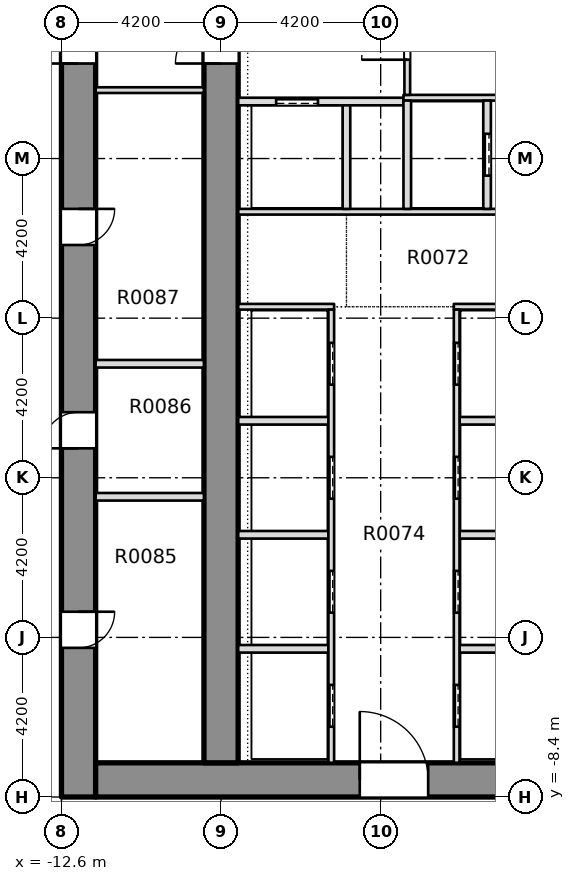
"""IFC4 building model, lengths in metres.
Left out: names, types, materials, properties, quantities, classifications, styles, units other than length and angle.
Written with IfcOpenShell. Run it as: python <this file> out.ifc"""

import sys

from ifc_helpers import new_model, si_unit, direction, frame, frame_2d, origin, place, context, subcontext, project, spatial, rectangle, extrude, element, fill, save


model = new_model("IFC4")
c1 = context("Model", 3, precision=1e-05, world=origin(), true_north=direction((0.0, 1.0)))
c2 = subcontext(c1, "Body", "Model", "MODEL_VIEW")
j1 = project(units=[si_unit("LENGTHUNIT", "METRE"), si_unit("PLANEANGLEUNIT", "RADIAN")], contexts=[c1])
p1 = place(None, origin())
s1 = spatial("IfcSite", under=j1, at=p1, CompositionType="ELEMENT")
p2 = place(p1, origin())
s2 = spatial("IfcBuilding", under=s1, at=p2, CompositionType="ELEMENT")
p3 = place(p2, origin())
s3 = spatial("IfcBuildingStorey", under=s2, at=p3, CompositionType="ELEMENT", Elevation=0.0)
p4 = place(p3, frame((-12.15, -8.4, -0.45), z_axis=(0.0, 0.0, 1.0), x_axis=(0.0, 1.0, 0.0)))
e1 = element("IfcWall", 1, at=p4, inside=s3, PredefinedType="SHEAR", context=c2, shape_type="SweptSolid", body=[
    extrude(rectangle(XDim=30.15, YDim=0.9, at=frame_2d((15.075, 0.0))), origin(), (0.0, 0.0, 1.0), 7.55),
])
p5 = place(p4, frame((3.925, 0.0, 0.45)))
e2 = element("IfcOpeningElement", 2, at=p5, cuts=e1, PredefinedType="OPENING", context=c2, shape_type="SweptSolid", body=[
    extrude(rectangle(XDim=0.95, YDim=2.1, at=frame_2d((0.475, 1.05))), frame((0.0, 0.46, 0.0), z_axis=(0.0, -1.0, 0.0), x_axis=(1.0, 0.0, 0.0)), (0.0, 0.0, 1.0), 0.92),
])
p6 = place(p4, frame((9.175, 0.0, 0.45)))
e3 = element("IfcOpeningElement", 3, at=p6, cuts=e1, PredefinedType="OPENING", context=c2, shape_type="SweptSolid", body=[
    extrude(rectangle(XDim=0.95, YDim=2.1, at=frame_2d((0.475, 1.05))), frame((0.0, 0.46, 0.0), z_axis=(0.0, -1.0, 0.0), x_axis=(1.0, 0.0, 0.0)), (0.0, 0.0, 1.0), 0.92),
])
p7 = place(p4, frame((14.525, 0.0, 0.45)))
e4 = element("IfcOpeningElement", 4, at=p7, cuts=e1, PredefinedType="OPENING", context=c2, shape_type="SweptSolid", body=[
    extrude(rectangle(XDim=0.95, YDim=2.1, at=frame_2d((0.475, 1.05))), frame((0.0, 0.46, 0.0), z_axis=(0.0, -1.0, 0.0), x_axis=(1.0, 0.0, 0.0)), (0.0, 0.0, 1.0), 0.92),
])
p8 = place(p4, frame((22.225, 0.0, 0.45)))
e5 = element("IfcOpeningElement", 5, at=p8, cuts=e1, PredefinedType="OPENING", context=c2, shape_type="SweptSolid", body=[
    extrude(rectangle(XDim=0.95, YDim=2.1, at=frame_2d((0.475, 1.05))), frame((0.0, 0.46, 0.0), z_axis=(0.0, -1.0, 0.0), x_axis=(1.0, 0.0, 0.0)), (0.0, 0.0, 1.0), 0.92),
])
p9 = place(p4, frame((26.25, 0.0, 0.45)))
e6 = element("IfcOpeningElement", 6, at=p9, cuts=e1, PredefinedType="OPENING", context=c2, shape_type="SweptSolid", body=[
    extrude(rectangle(XDim=0.95, YDim=2.1, at=frame_2d((0.475, 1.05))), frame((0.0, 0.46, 0.0), z_axis=(0.0, -1.0, 0.0), x_axis=(1.0, 0.0, 0.0)), (0.0, 0.0, 1.0), 0.92),
])
p10 = place(p4, frame((19.3, 0.0, 0.45)))
e7 = element("IfcOpeningElement", 7, at=p10, cuts=e1, PredefinedType="OPENING", context=c2, shape_type="SweptSolid", body=[
    extrude(rectangle(XDim=1.2, YDim=2.1, at=frame_2d((0.6, 1.05))), frame((0.0, 0.46, 0.0), z_axis=(0.0, -1.0, 0.0), x_axis=(1.0, 0.0, 0.0)), (0.0, 0.0, 1.0), 0.92),
])
p11 = place(p3, frame((-11.7, -7.95, -0.45), z_axis=(0.0, 0.0, 1.0), x_axis=(1.0, 0.0, 0.0)))
e8 = element("IfcWall", 8, at=p11, inside=s3, PredefinedType="SHEAR", context=c2, shape_type="SweptSolid", body=[
    extrude(rectangle(XDim=23.4, YDim=0.9, at=frame_2d((11.7, 0.0))), origin(), (0.0, 0.0, 1.0), 7.55),
])
p12 = place(p11, frame((6.95, 0.0, 0.45)))
e9 = element("IfcOpeningElement", 9, at=p12, cuts=e8, PredefinedType="OPENING", context=c2, shape_type="SweptSolid", body=[
    extrude(rectangle(XDim=1.8, YDim=2.1, at=frame_2d((0.9, 1.05))), frame((0.0, 0.46, 0.0), z_axis=(0.0, -1.0, 0.0), x_axis=(1.0, 0.0, 0.0)), (0.0, 0.0, 1.0), 0.92),
])
p13 = place(p11, frame((14.65, 0.0, 0.45)))
e10 = element("IfcOpeningElement", 10, at=p13, cuts=e8, PredefinedType="OPENING", context=c2, shape_type="SweptSolid", body=[
    extrude(rectangle(XDim=1.8, YDim=2.1, at=frame_2d((0.9, 1.05))), frame((0.0, 0.46, 0.0), z_axis=(0.0, -1.0, 0.0), x_axis=(1.0, 0.0, 0.0)), (0.0, 0.0, 1.0), 0.92),
])
p14 = place(p3, frame((-8.4, -7.5, -0.45), z_axis=(0.0, 0.0, 1.0), x_axis=(0.0, 1.0, 0.0)))
e11 = element("IfcWall", 11, at=p14, inside=s3, PredefinedType="SHEAR", context=c2, shape_type="SweptSolid", body=[
    extrude(rectangle(XDim=28.35, YDim=0.9, at=frame_2d((14.175, 0.0))), origin(), (0.0, 0.0, 1.0), 7.55),
])
p15 = place(p14, frame((18.4, 0.0, 0.45)))
e12 = element("IfcOpeningElement", 12, at=p15, cuts=e11, PredefinedType="OPENING", context=c2, shape_type="SweptSolid", body=[
    extrude(rectangle(XDim=1.2, YDim=2.1, at=frame_2d((0.6, 1.05))), frame((0.0, 0.46, 0.0), z_axis=(0.0, -1.0, 0.0), x_axis=(1.0, 0.0, 0.0)), (0.0, 0.0, 1.0), 0.92),
])
p16 = place(p3, frame((-7.949, -4.5, 0.0), z_axis=(0.0, 0.0, 1.0), x_axis=(1.0, 0.0, 0.0)))
e13 = element("IfcWall", 13, at=p16, inside=s3, PredefinedType="PARTITIONING", context=c2, shape_type="SweptSolid", body=[
    extrude(rectangle(XDim=2.374, YDim=0.2, at=frame_2d((1.187, 0.0))), origin(), (0.0, 0.0, 1.0), 7.1),
])
p17 = place(p3, frame((-2.125, -4.5, 0.0), z_axis=(0.0, 0.0, 1.0), x_axis=(1.0, 0.0, 0.0)))
e14 = element("IfcWall", 14, at=p17, inside=s3, PredefinedType="PARTITIONING", context=c2, shape_type="SweptSolid", body=[
    extrude(rectangle(XDim=4.25, YDim=0.2, at=frame_2d((2.125, 0.0))), origin(), (0.0, 0.0, 1.0), 7.1),
])
p18 = place(p3, frame((-7.949, -1.5, 0.0), z_axis=(0.0, 0.0, 1.0), x_axis=(1.0, 0.0, 0.0)))
e15 = element("IfcWall", 15, at=p18, inside=s3, PredefinedType="PARTITIONING", context=c2, shape_type="SweptSolid", body=[
    extrude(rectangle(XDim=2.374, YDim=0.2, at=frame_2d((1.187, 0.0))), origin(), (0.0, 0.0, 1.0), 7.1),
])
p19 = place(p3, frame((-2.125, -1.5, 0.0), z_axis=(0.0, 0.0, 1.0), x_axis=(1.0, 0.0, 0.0)))
e16 = element("IfcWall", 16, at=p19, inside=s3, PredefinedType="PARTITIONING", context=c2, shape_type="SweptSolid", body=[
    extrude(rectangle(XDim=4.25, YDim=0.2, at=frame_2d((2.125, 0.0))), origin(), (0.0, 0.0, 1.0), 7.1),
])
p20 = place(p3, frame((-7.949, 1.5, 0.0), z_axis=(0.0, 0.0, 1.0), x_axis=(1.0, 0.0, 0.0)))
e17 = element("IfcWall", 17, at=p20, inside=s3, PredefinedType="PARTITIONING", context=c2, shape_type="SweptSolid", body=[
    extrude(rectangle(XDim=2.374, YDim=0.2, at=frame_2d((1.187, 0.0))), origin(), (0.0, 0.0, 1.0), 7.1),
])
p21 = place(p3, frame((-2.125, 1.5, 0.0), z_axis=(0.0, 0.0, 1.0), x_axis=(1.0, 0.0, 0.0)))
e18 = element("IfcWall", 18, at=p21, inside=s3, PredefinedType="PARTITIONING", context=c2, shape_type="SweptSolid", body=[
    extrude(rectangle(XDim=4.25, YDim=0.2, at=frame_2d((2.125, 0.0))), origin(), (0.0, 0.0, 1.0), 7.1),
])
p22 = place(p3, frame((-7.949, 4.5, 0.0), z_axis=(0.0, 0.0, 1.0), x_axis=(1.0, 0.0, 0.0)))
e19 = element("IfcWall", 19, at=p22, inside=s3, PredefinedType="PARTITIONING", context=c2, shape_type="SweptSolid", body=[
    extrude(rectangle(XDim=2.524, YDim=0.15, at=frame_2d((1.262, 0.0))), origin(), (0.0, 0.0, 1.0), 7.1),
])
p23 = place(p3, frame((-2.275, 4.5, 0.0), z_axis=(0.0, 0.0, 1.0), x_axis=(1.0, 0.0, 0.0)))
e20 = element("IfcWall", 20, at=p23, inside=s3, PredefinedType="PARTITIONING", context=c2, shape_type="SweptSolid", body=[
    extrude(rectangle(XDim=4.55, YDim=0.15, at=frame_2d((2.275, 0.0))), origin(), (0.0, 0.0, 1.0), 7.1),
])
p24 = place(p3, frame((-7.949, 7.0, 0.0), z_axis=(0.0, 0.0, 1.0), x_axis=(1.0, 0.0, 0.0)))
e21 = element("IfcWall", 21, at=p24, inside=s3, PredefinedType="PARTITIONING", context=c2, shape_type="SweptSolid", body=[
    extrude(rectangle(XDim=15.898, YDim=0.15, at=frame_2d((7.949, 0.0))), origin(), (0.0, 0.0, 1.0), 7.1),
])
p25 = place(p24, frame((7.249, 0.0, 0.0)))
e22 = element("IfcOpeningElement", 22, at=p25, cuts=e21, PredefinedType="OPENING", context=c2, shape_type="SweptSolid", body=[
    extrude(rectangle(XDim=1.4, YDim=2.1, at=frame_2d((0.7, 1.05))), frame((0.0, 0.085, 0.0), z_axis=(0.0, -1.0, 0.0), x_axis=(1.0, 0.0, 0.0)), (0.0, 0.0, 1.0), 0.17),
])
p26 = place(p3, frame((-7.949, 9.9, 0.0), z_axis=(0.0, 0.0, 1.0), x_axis=(1.0, 0.0, 0.0)))
e23 = element("IfcWall", 23, at=p26, inside=s3, PredefinedType="PARTITIONING", context=c2, shape_type="SweptSolid", body=[
    extrude(rectangle(XDim=4.349, YDim=0.2, at=frame_2d((2.174, 0.0))), origin(), (0.0, 0.0, 1.0), 7.1),
])
p27 = place(p26, frame((0.999, 0.0, 0.0)))
e24 = element("IfcOpeningElement", 24, at=p27, cuts=e23, PredefinedType="OPENING", context=c2, shape_type="SweptSolid", body=[
    extrude(rectangle(XDim=1.1, YDim=2.1, at=frame_2d((0.55, 1.05))), frame((0.0, 0.11, 0.0), z_axis=(0.0, -1.0, 0.0), x_axis=(1.0, 0.0, 0.0)), (0.0, 0.0, 1.0), 0.22),
])
p28 = place(p3, frame((-3.6, 10.0, 0.0), z_axis=(0.0, 0.0, 1.0), x_axis=(1.0, 0.0, 0.0)))
e25 = element("IfcWall", 25, at=p28, inside=s3, PredefinedType="PARTITIONING", context=c2, shape_type="SweptSolid", body=[
    extrude(rectangle(XDim=7.2, YDim=0.15, at=frame_2d((3.6, 0.0))), origin(), (0.0, 0.0, 1.0), 7.1),
])
p29 = place(p28, frame((2.9, 0.0, 0.0)))
e26 = element("IfcOpeningElement", 26, at=p29, cuts=e25, PredefinedType="OPENING", context=c2, shape_type="SweptSolid", body=[
    extrude(rectangle(XDim=1.4, YDim=2.1, at=frame_2d((0.7, 1.05))), frame((0.0, 0.085, 0.0), z_axis=(0.0, -1.0, 0.0), x_axis=(1.0, 0.0, 0.0)), (0.0, 0.0, 1.0), 0.17),
])
p30 = place(p3, frame((-5.5, -7.499, 0.0), z_axis=(0.0, 0.0, 1.0), x_axis=(0.0, 1.0, 0.0)))
e27 = element("IfcWall", 27, at=p30, inside=s3, PredefinedType="PARTITIONING", context=c2, shape_type="SweptSolid", body=[
    extrude(rectangle(XDim=11.924, YDim=0.15, at=frame_2d((5.962, 0.0))), origin(), (0.0, 0.0, 1.0), 7.1),
])
p31 = place(p30, frame((0.949, 0.0, 0.0)))
e28 = element("IfcOpeningElement", 28, at=p31, cuts=e27, PredefinedType="OPENING", context=c2, shape_type="SweptSolid", body=[
    extrude(rectangle(XDim=1.1, YDim=2.1, at=frame_2d((0.55, 1.05))), frame((0.0, 0.085, 0.0), z_axis=(0.0, -1.0, 0.0), x_axis=(1.0, 0.0, 0.0)), (0.0, 0.0, 1.0), 0.17),
])
p32 = place(p30, frame((3.949, 0.0, 0.0)))
e29 = element("IfcOpeningElement", 29, at=p32, cuts=e27, PredefinedType="OPENING", context=c2, shape_type="SweptSolid", body=[
    extrude(rectangle(XDim=1.1, YDim=2.1, at=frame_2d((0.55, 1.05))), frame((0.0, 0.085, 0.0), z_axis=(0.0, -1.0, 0.0), x_axis=(1.0, 0.0, 0.0)), (0.0, 0.0, 1.0), 0.17),
])
p33 = place(p30, frame((6.949, 0.0, 0.0)))
e30 = element("IfcOpeningElement", 30, at=p33, cuts=e27, PredefinedType="OPENING", context=c2, shape_type="SweptSolid", body=[
    extrude(rectangle(XDim=1.1, YDim=2.1, at=frame_2d((0.55, 1.05))), frame((0.0, 0.085, 0.0), z_axis=(0.0, -1.0, 0.0), x_axis=(1.0, 0.0, 0.0)), (0.0, 0.0, 1.0), 0.17),
])
p34 = place(p30, frame((9.949, 0.0, 0.0)))
e31 = element("IfcOpeningElement", 31, at=p34, cuts=e27, PredefinedType="OPENING", context=c2, shape_type="SweptSolid", body=[
    extrude(rectangle(XDim=1.1, YDim=2.1, at=frame_2d((0.55, 1.05))), frame((0.0, 0.085, 0.0), z_axis=(0.0, -1.0, 0.0), x_axis=(1.0, 0.0, 0.0)), (0.0, 0.0, 1.0), 0.17),
])
p35 = place(p3, frame((-5.1, 7.075, 0.0), z_axis=(0.0, 0.0, 1.0), x_axis=(0.0, 1.0, 0.0)))
e32 = element("IfcWall", 32, at=p35, inside=s3, PredefinedType="PARTITIONING", context=c2, shape_type="SweptSolid", body=[
    extrude(rectangle(XDim=2.725, YDim=0.2, at=frame_2d((1.363, 0.0))), origin(), (0.0, 0.0, 1.0), 7.1),
])
p36 = place(p3, frame((-3.5, 7.075, 0.0), z_axis=(0.0, 0.0, 1.0), x_axis=(0.0, 1.0, 0.0)))
e33 = element("IfcWall", 33, at=p36, inside=s3, PredefinedType="PARTITIONING", context=c2, shape_type="SweptSolid", body=[
    extrude(rectangle(XDim=2.85, YDim=0.2, at=frame_2d((1.425, 0.0))), origin(), (0.0, 0.0, 1.0), 7.1),
])
p37 = place(p3, frame((-3.5, 10.075, 0.0), z_axis=(0.0, 0.0, 1.0), x_axis=(0.0, 1.0, 0.0)))
e34 = element("IfcWall", 34, at=p37, inside=s3, PredefinedType="PARTITIONING", context=c2, shape_type="SweptSolid", body=[
    extrude(rectangle(XDim=3.075, YDim=0.15, at=frame_2d((1.538, 0.0))), origin(), (0.0, 0.0, 1.0), 7.1),
])
p38 = place(p37, frame((0.925, 0.0, 0.0)))
e35 = element("IfcOpeningElement", 35, at=p38, cuts=e34, PredefinedType="OPENING", context=c2, shape_type="SweptSolid", body=[
    extrude(rectangle(XDim=1.2, YDim=2.1, at=frame_2d((0.6, 1.05))), frame((0.0, 0.085, 0.0), z_axis=(0.0, -1.0, 0.0), x_axis=(1.0, 0.0, 0.0)), (0.0, 0.0, 1.0), 0.17),
])
p39 = place(p3, frame((-2.2, -7.499, 0.0), z_axis=(0.0, 0.0, 1.0), x_axis=(0.0, 1.0, 0.0)))
e36 = element("IfcWall", 36, at=p39, inside=s3, PredefinedType="PARTITIONING", context=c2, shape_type="SweptSolid", body=[
    extrude(rectangle(XDim=11.924, YDim=0.15, at=frame_2d((5.962, 0.0))), origin(), (0.0, 0.0, 1.0), 7.1),
])
p40 = place(p39, frame((0.949, 0.0, 0.0)))
e37 = element("IfcOpeningElement", 37, at=p40, cuts=e36, PredefinedType="OPENING", context=c2, shape_type="SweptSolid", body=[
    extrude(rectangle(XDim=1.1, YDim=2.1, at=frame_2d((0.55, 1.05))), frame((0.0, 0.085, 0.0), z_axis=(0.0, -1.0, 0.0), x_axis=(1.0, 0.0, 0.0)), (0.0, 0.0, 1.0), 0.17),
])
p41 = place(p39, frame((3.949, 0.0, 0.0)))
e38 = element("IfcOpeningElement", 38, at=p41, cuts=e36, PredefinedType="OPENING", context=c2, shape_type="SweptSolid", body=[
    extrude(rectangle(XDim=1.1, YDim=2.1, at=frame_2d((0.55, 1.05))), frame((0.0, 0.085, 0.0), z_axis=(0.0, -1.0, 0.0), x_axis=(1.0, 0.0, 0.0)), (0.0, 0.0, 1.0), 0.17),
])
p42 = place(p39, frame((6.949, 0.0, 0.0)))
e39 = element("IfcOpeningElement", 39, at=p42, cuts=e36, PredefinedType="OPENING", context=c2, shape_type="SweptSolid", body=[
    extrude(rectangle(XDim=1.1, YDim=2.1, at=frame_2d((0.55, 1.05))), frame((0.0, 0.085, 0.0), z_axis=(0.0, -1.0, 0.0), x_axis=(1.0, 0.0, 0.0)), (0.0, 0.0, 1.0), 0.17),
])
p43 = place(p39, frame((9.949, 0.0, 0.0)))
e40 = element("IfcOpeningElement", 40, at=p43, cuts=e36, PredefinedType="OPENING", context=c2, shape_type="SweptSolid", body=[
    extrude(rectangle(XDim=1.1, YDim=2.1, at=frame_2d((0.55, 1.05))), frame((0.0, 0.085, 0.0), z_axis=(0.0, -1.0, 0.0), x_axis=(1.0, 0.0, 0.0)), (0.0, 0.0, 1.0), 0.17),
])
p44 = place(p3, frame((-1.4, 7.075, 0.0), z_axis=(0.0, 0.0, 1.0), x_axis=(0.0, 1.0, 0.0)))
e41 = element("IfcWall", 41, at=p44, inside=s3, PredefinedType="PARTITIONING", context=c2, shape_type="SweptSolid", body=[
    extrude(rectangle(XDim=2.85, YDim=0.2, at=frame_2d((1.425, 0.0))), origin(), (0.0, 0.0, 1.0), 7.1),
])
p45 = place(p44, frame((0.875, 0.0, 0.0)))
e42 = element("IfcOpeningElement", 42, at=p45, cuts=e41, PredefinedType="OPENING", context=c2, shape_type="SweptSolid", body=[
    extrude(rectangle(XDim=1.1, YDim=2.1, at=frame_2d((0.55, 1.05))), frame((0.0, 0.11, 0.0), z_axis=(0.0, -1.0, 0.0), x_axis=(1.0, 0.0, 0.0)), (0.0, 0.0, 1.0), 0.22),
])
for number, where, z_axis, x_axis in (
    (43, (-11.699, -0.5, 0.0), (0.0, 0.0, 1.0), (1.0, 0.0, 0.0)),
    (44, (-11.699, 3.0, 0.0), (0.0, 0.0, 1.0), (1.0, 0.0, 0.0)),
):
    element("IfcWall", number, at=place(p3, frame(where, z_axis=z_axis, x_axis=x_axis)), inside=s3, PredefinedType="PARTITIONING", context=c2, shape_type="SweptSolid", body=[
        extrude(rectangle(XDim=2.848, YDim=0.2, at=frame_2d((1.424, 0.0))), origin(), (0.0, 0.0, 1.0), 7.1),
    ])
p46 = place(p3, frame((-11.699, 10.2, 0.0), z_axis=(0.0, 0.0, 1.0), x_axis=(1.0, 0.0, 0.0)))
e45 = element("IfcWall", 45, at=p46, inside=s3, PredefinedType="PARTITIONING", context=c2, shape_type="SweptSolid", body=[
    extrude(rectangle(XDim=2.848, YDim=0.15, at=frame_2d((1.424, 0.0))), origin(), (0.0, 0.0, 1.0), 7.1),
])
p47 = place(p31, origin())
e46 = element("IfcDoor", 46, at=p47, inside=s3, OperationType="SLIDING_TO_RIGHT", PredefinedType="DOOR", context=c2, shape_type="SweptSolid", body=[
    extrude(rectangle(XDim=1.1, YDim=2.1, at=frame_2d((0.55, 1.05))), frame((0.0, 0.025, 0.0), z_axis=(0.0, -1.0, 0.0), x_axis=(1.0, 0.0, 0.0)), (0.0, 0.0, 1.0), 0.05),
])
fill(e28, e46)
p48 = place(p32, origin())
e47 = element("IfcDoor", 47, at=p48, inside=s3, OperationType="SLIDING_TO_RIGHT", PredefinedType="DOOR", context=c2, shape_type="SweptSolid", body=[
    extrude(rectangle(XDim=1.1, YDim=2.1, at=frame_2d((0.55, 1.05))), frame((0.0, 0.025, 0.0), z_axis=(0.0, -1.0, 0.0), x_axis=(1.0, 0.0, 0.0)), (0.0, 0.0, 1.0), 0.05),
])
fill(e29, e47)
p49 = place(p33, origin())
e48 = element("IfcDoor", 48, at=p49, inside=s3, OperationType="SLIDING_TO_RIGHT", PredefinedType="DOOR", context=c2, shape_type="SweptSolid", body=[
    extrude(rectangle(XDim=1.1, YDim=2.1, at=frame_2d((0.55, 1.05))), frame((0.0, 0.025, 0.0), z_axis=(0.0, -1.0, 0.0), x_axis=(1.0, 0.0, 0.0)), (0.0, 0.0, 1.0), 0.05),
])
fill(e30, e48)
p50 = place(p34, origin())
e49 = element("IfcDoor", 49, at=p50, inside=s3, OperationType="SLIDING_TO_RIGHT", PredefinedType="DOOR", context=c2, shape_type="SweptSolid", body=[
    extrude(rectangle(XDim=1.1, YDim=2.1, at=frame_2d((0.55, 1.05))), frame((0.0, 0.025, 0.0), z_axis=(0.0, -1.0, 0.0), x_axis=(1.0, 0.0, 0.0)), (0.0, 0.0, 1.0), 0.05),
])
fill(e31, e49)
p51 = place(p40, origin())
e50 = element("IfcDoor", 50, at=p51, inside=s3, OperationType="SLIDING_TO_RIGHT", PredefinedType="DOOR", context=c2, shape_type="SweptSolid", body=[
    extrude(rectangle(XDim=1.1, YDim=2.1, at=frame_2d((0.55, 1.05))), frame((0.0, 0.025, 0.0), z_axis=(0.0, -1.0, 0.0), x_axis=(1.0, 0.0, 0.0)), (0.0, 0.0, 1.0), 0.05),
])
fill(e37, e50)
p52 = place(p41, origin())
e51 = element("IfcDoor", 51, at=p52, inside=s3, OperationType="SLIDING_TO_RIGHT", PredefinedType="DOOR", context=c2, shape_type="SweptSolid", body=[
    extrude(rectangle(XDim=1.1, YDim=2.1, at=frame_2d((0.55, 1.05))), frame((0.0, 0.025, 0.0), z_axis=(0.0, -1.0, 0.0), x_axis=(1.0, 0.0, 0.0)), (0.0, 0.0, 1.0), 0.05),
])
fill(e38, e51)
p53 = place(p42, origin())
e52 = element("IfcDoor", 52, at=p53, inside=s3, OperationType="SLIDING_TO_RIGHT", PredefinedType="DOOR", context=c2, shape_type="SweptSolid", body=[
    extrude(rectangle(XDim=1.1, YDim=2.1, at=frame_2d((0.55, 1.05))), frame((0.0, 0.025, 0.0), z_axis=(0.0, -1.0, 0.0), x_axis=(1.0, 0.0, 0.0)), (0.0, 0.0, 1.0), 0.05),
])
fill(e39, e52)
p54 = place(p43, origin())
e53 = element("IfcDoor", 53, at=p54, inside=s3, OperationType="SLIDING_TO_RIGHT", PredefinedType="DOOR", context=c2, shape_type="SweptSolid", body=[
    extrude(rectangle(XDim=1.1, YDim=2.1, at=frame_2d((0.55, 1.05))), frame((0.0, 0.025, 0.0), z_axis=(0.0, -1.0, 0.0), x_axis=(1.0, 0.0, 0.0)), (0.0, 0.0, 1.0), 0.05),
])
fill(e40, e53)
p55 = place(p27, origin())
e54 = element("IfcDoor", 54, at=p55, inside=s3, OperationType="SLIDING_TO_RIGHT", PredefinedType="DOOR", context=c2, shape_type="SweptSolid", body=[
    extrude(rectangle(XDim=1.1, YDim=2.1, at=frame_2d((0.55, 1.05))), frame((0.0, 0.025, 0.0), z_axis=(0.0, -1.0, 0.0), x_axis=(1.0, 0.0, 0.0)), (0.0, 0.0, 1.0), 0.05),
])
fill(e24, e54)
p56 = place(p45, origin())
e55 = element("IfcDoor", 55, at=p56, inside=s3, OperationType="SLIDING_TO_RIGHT", PredefinedType="DOOR", context=c2, shape_type="SweptSolid", body=[
    extrude(rectangle(XDim=1.1, YDim=2.1, at=frame_2d((0.55, 1.05))), frame((0.0, 0.025, 0.0), z_axis=(0.0, -1.0, 0.0), x_axis=(1.0, 0.0, 0.0)), (0.0, 0.0, 1.0), 0.05),
])
fill(e42, e55)
p57 = place(p38, origin())
e56 = element("IfcDoor", 56, at=p57, inside=s3, OperationType="SINGLE_SWING_RIGHT", PredefinedType="DOOR", context=c2, shape_type="SweptSolid", body=[
    extrude(rectangle(XDim=1.2, YDim=2.1, at=frame_2d((0.6, 1.05))), frame((0.0, 0.025, 0.0), z_axis=(0.0, -1.0, 0.0), x_axis=(1.0, 0.0, 0.0)), (0.0, 0.0, 1.0), 0.05),
])
fill(e35, e56)
p58 = place(p12, origin())
e57 = element("IfcDoor", 57, at=p58, inside=s3, OperationType="SINGLE_SWING_LEFT", PredefinedType="DOOR", context=c2, shape_type="SweptSolid", body=[
    extrude(rectangle(XDim=1.8, YDim=2.1, at=frame_2d((0.9, 1.05))), frame((0.0, 0.025, 0.0), z_axis=(0.0, -1.0, 0.0), x_axis=(1.0, 0.0, 0.0)), (0.0, 0.0, 1.0), 0.05),
])
fill(e9, e57)
p59 = place(p5, origin())
e58 = element("IfcDoor", 58, at=p59, inside=s3, OperationType="SINGLE_SWING_LEFT", PredefinedType="DOOR", context=c2, shape_type="SweptSolid", body=[
    extrude(rectangle(XDim=0.95, YDim=2.1, at=frame_2d((0.475, 1.05))), frame((0.0, 0.025, 0.0), z_axis=(0.0, -1.0, 0.0), x_axis=(1.0, 0.0, 0.0)), (0.0, 0.0, 1.0), 0.05),
])
fill(e2, e58)
p60 = place(p6, origin())
e59 = element("IfcDoor", 59, at=p60, inside=s3, OperationType="SINGLE_SWING_LEFT", PredefinedType="DOOR", context=c2, shape_type="SweptSolid", body=[
    extrude(rectangle(XDim=0.95, YDim=2.1, at=frame_2d((0.475, 1.05))), frame((0.0, 0.025, 0.0), z_axis=(0.0, -1.0, 0.0), x_axis=(1.0, 0.0, 0.0)), (0.0, 0.0, 1.0), 0.05),
])
fill(e3, e59)
p61 = place(p7, origin())
e60 = element("IfcDoor", 60, at=p61, inside=s3, OperationType="SINGLE_SWING_LEFT", PredefinedType="DOOR", context=c2, shape_type="SweptSolid", body=[
    extrude(rectangle(XDim=0.95, YDim=2.1, at=frame_2d((0.475, 1.05))), frame((0.0, 0.025, 0.0), z_axis=(0.0, -1.0, 0.0), x_axis=(1.0, 0.0, 0.0)), (0.0, 0.0, 1.0), 0.05),
])
fill(e4, e60)
p62 = place(p10, origin())
e61 = element("IfcDoor", 61, at=p62, inside=s3, OperationType="SINGLE_SWING_LEFT", PredefinedType="DOOR", context=c2, shape_type="SweptSolid", body=[
    extrude(rectangle(XDim=1.2, YDim=2.1, at=frame_2d((0.6, 1.05))), frame((0.0, 0.025, 0.0), z_axis=(0.0, -1.0, 0.0), x_axis=(1.0, 0.0, 0.0)), (0.0, 0.0, 1.0), 0.05),
])
fill(e7, e61)
p63 = place(p15, origin())
e62 = element("IfcDoor", 62, at=p63, inside=s3, OperationType="SINGLE_SWING_LEFT", PredefinedType="DOOR", context=c2, shape_type="SweptSolid", body=[
    extrude(rectangle(XDim=1.2, YDim=2.1, at=frame_2d((0.6, 1.05))), frame((0.0, 0.025, 0.0), z_axis=(0.0, -1.0, 0.0), x_axis=(1.0, 0.0, 0.0)), (0.0, 0.0, 1.0), 0.05),
])
fill(e12, e62)
save(model, sys.argv[1])
